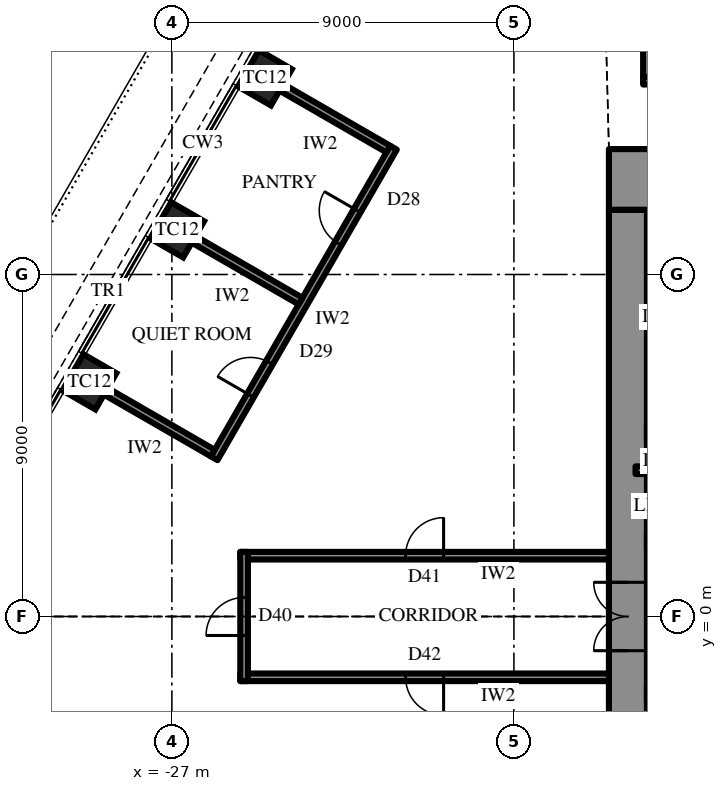
"""IFC4 building model, lengths in metres.
Left out: names, types, materials, properties, quantities, classifications, styles, units other than length and angle.
Written with IfcOpenShell. Run it as: python <this file> out.ifc"""

import sys

from ifc_helpers import new_model, si_unit, direction, frame, frame_2d, origin, origin_2d, place, context, subcontext, project, spatial, rectangle, extrude, element, fill, save


model = new_model("IFC4")
c1 = context("Model", 3, precision=1e-05, world=origin(), true_north=direction((0.0, 1.0)))
c2 = subcontext(c1, "Body", "Model", "MODEL_VIEW")
j1 = project(units=[si_unit("LENGTHUNIT", "METRE"), si_unit("PLANEANGLEUNIT", "RADIAN")], contexts=[c1])
p1 = place(None, origin())
s1 = spatial("IfcSite", under=j1, at=p1, CompositionType="ELEMENT")
p2 = place(p1, origin())
s2 = spatial("IfcBuilding", under=s1, at=p2, CompositionType="ELEMENT")
p3 = place(p2, frame((0.0, 0.0, 286.9)))
s3 = spatial("IfcBuildingStorey", under=s2, at=p3, CompositionType="ELEMENT", Elevation=286.9)
for number, where, z_axis, x_axis in (
    (1, (-24.552, 14.175, 0.0), (0.0, 0.0, 1.0), (-0.5, -0.866, 0.0)),
    (2, (-26.861, 10.175, 0.0), (0.0, 0.0, 1.0), (-0.5, -0.866, 0.0)),
    (3, (-29.171, 6.175, 0.0), (0.0, 0.0, 1.0), (-0.5, -0.866, 0.0)),
):
    element("IfcColumn", number, at=place(p3, frame(where, z_axis=z_axis, x_axis=x_axis)), inside=s3, PredefinedType="COLUMN", context=c2, shape_type="SweptSolid", body=[
        extrude(rectangle(XDim=1.1, YDim=1.0, at=origin_2d()), origin(), (0.0, 0.0, 1.0), 4.2),
    ])
p4 = place(p3, frame((-15.5, 11.5, 0.0), z_axis=(0.0, 0.0, 1.0), x_axis=(1.0, 0.0, 0.0)))
e4 = element("IfcWall", 4, at=p4, inside=s3, PredefinedType="SHEAR", context=c2, shape_type="SweptSolid", body=[
    extrude(rectangle(XDim=31.0, YDim=1.6, at=frame_2d((15.5, 0.0))), origin(), (0.0, 0.0, 1.0), 4.2),
])
p5 = place(p4, frame((16.35, 0.0, 0.0)))
e5 = element("IfcOpeningElement", 5, at=p5, cuts=e4, PredefinedType="OPENING", context=c2, shape_type="SweptSolid", body=[
    extrude(rectangle(XDim=0.9, YDim=2.2, at=frame_2d((0.45, 1.1))), frame((0.0, 0.81, 0.0), z_axis=(0.0, -1.0, 0.0), x_axis=(1.0, 0.0, 0.0)), (0.0, 0.0, 1.0), 1.62),
])
p6 = place(p4, frame((19.35, 0.0, 0.0)))
e6 = element("IfcOpeningElement", 6, at=p6, cuts=e4, PredefinedType="OPENING", context=c2, shape_type="SweptSolid", body=[
    extrude(rectangle(XDim=0.9, YDim=2.2, at=frame_2d((0.45, 1.1))), frame((0.0, 0.81, 0.0), z_axis=(0.0, -1.0, 0.0), x_axis=(1.0, 0.0, 0.0)), (0.0, 0.0, 1.0), 1.62),
])
p7 = place(p4, frame((22.4, 0.0, 0.0)))
e7 = element("IfcOpeningElement", 7, at=p7, cuts=e4, PredefinedType="OPENING", context=c2, shape_type="SweptSolid", body=[
    extrude(rectangle(XDim=1.0, YDim=2.2, at=frame_2d((0.5, 1.1))), frame((0.0, 0.81, 0.0), z_axis=(0.0, -1.0, 0.0), x_axis=(1.0, 0.0, 0.0)), (0.0, 0.0, 1.0), 1.62),
])
p8 = place(p4, frame((1.65, 0.0, 0.0)))
e8 = element("IfcOpeningElement", 8, at=p8, cuts=e4, PredefinedType="OPENING", context=c2, shape_type="SweptSolid", body=[
    extrude(rectangle(XDim=0.9, YDim=2.2, at=frame_2d((0.45, 1.1))), frame((0.0, 0.81, 0.0), z_axis=(0.0, -1.0, 0.0), x_axis=(1.0, 0.0, 0.0)), (0.0, 0.0, 1.0), 1.62),
])
p9 = place(p4, frame((4.65, 0.0, 0.0)))
e9 = element("IfcOpeningElement", 9, at=p9, cuts=e4, PredefinedType="OPENING", context=c2, shape_type="SweptSolid", body=[
    extrude(rectangle(XDim=0.9, YDim=2.2, at=frame_2d((0.45, 1.1))), frame((0.0, 0.81, 0.0), z_axis=(0.0, -1.0, 0.0), x_axis=(1.0, 0.0, 0.0)), (0.0, 0.0, 1.0), 1.62),
])
p10 = place(p4, frame((25.45, 0.0, 0.0)))
e10 = element("IfcOpeningElement", 10, at=p10, cuts=e4, PredefinedType="OPENING", context=c2, shape_type="SweptSolid", body=[
    extrude(rectangle(XDim=0.9, YDim=2.2, at=frame_2d((0.45, 1.1))), frame((0.0, 0.81, 0.0), z_axis=(0.0, -1.0, 0.0), x_axis=(1.0, 0.0, 0.0)), (0.0, 0.0, 1.0), 1.62),
])
p11 = place(p4, frame((28.45, 0.0, 0.0)))
e11 = element("IfcOpeningElement", 11, at=p11, cuts=e4, PredefinedType="OPENING", context=c2, shape_type="SweptSolid", body=[
    extrude(rectangle(XDim=0.9, YDim=2.2, at=frame_2d((0.45, 1.1))), frame((0.0, 0.81, 0.0), z_axis=(0.0, -1.0, 0.0), x_axis=(1.0, 0.0, 0.0)), (0.0, 0.0, 1.0), 1.62),
])
p12 = place(p3, frame((-15.0, 10.7, 0.0), z_axis=(0.0, 0.0, 1.0), x_axis=(0.0, -1.0, 0.0)))
e12 = element("IfcWall", 12, at=p12, inside=s3, PredefinedType="SHEAR", context=c2, shape_type="SweptSolid", body=[
    extrude(rectangle(XDim=21.4, YDim=1.0, at=frame_2d((10.7, 0.0))), origin(), (0.0, 0.0, 1.0), 4.2),
])
p13 = place(p12, frame((9.8, 0.0, 0.0)))
e13 = element("IfcOpeningElement", 13, at=p13, cuts=e12, PredefinedType="OPENING", context=c2, shape_type="SweptSolid", body=[
    extrude(rectangle(XDim=1.8, YDim=2.4, at=frame_2d((0.9, 1.2))), frame((0.0, 0.51, 0.0), z_axis=(0.0, -1.0, 0.0), x_axis=(1.0, 0.0, 0.0)), (0.0, 0.0, 1.0), 1.02),
])
p14 = place(p3, frame((-12.3, -2.0, 0.0), z_axis=(0.0, 0.0, 1.0), x_axis=(-1.0, 0.0, 0.0)))
e14 = element("IfcWall", 14, at=p14, inside=s3, PredefinedType="SHEAR", context=c2, shape_type="SweptSolid", body=[
    extrude(rectangle(XDim=2.2, YDim=0.5, at=frame_2d((1.1, 0.0))), origin(), (0.0, 0.0, 1.0), 4.2),
])
p15 = place(p14, frame((0.8, 0.0, 0.0)))
e15 = element("IfcOpeningElement", 15, at=p15, cuts=e14, PredefinedType="OPENING", context=c2, shape_type="SweptSolid", body=[
    extrude(rectangle(XDim=0.9, YDim=2.2, at=frame_2d((0.45, 1.1))), frame((0.0, 0.26, 0.0), z_axis=(0.0, -1.0, 0.0), x_axis=(1.0, 0.0, 0.0)), (0.0, 0.0, 1.0), 0.52),
])
p16 = place(p3, frame((-14.8, 3.85, 0.0), z_axis=(0.0, 0.0, 1.0), x_axis=(1.0, 0.0, 0.0)))
e16 = element("IfcWall", 16, at=p16, inside=s3, PredefinedType="PARTITIONING", context=c2, shape_type="SweptSolid", body=[
    extrude(rectangle(XDim=2.5, YDim=0.2, at=frame_2d((1.25, 0.0))), origin(), (0.0, 0.0, 1.0), 4.0),
])
p17 = place(p3, frame((-14.6, 14.1, 0.0), z_axis=(0.0, 0.0, 1.0), x_axis=(1.0, 0.0, 0.0)))
e17 = element("IfcWall", 17, at=p17, inside=s3, PredefinedType="PARTITIONING", context=c2, shape_type="SweptSolid", body=[
    extrude(rectangle(XDim=29.2, YDim=0.2, at=frame_2d((14.6, 0.0))), origin(), (0.0, 0.0, 1.0), 4.0),
])
p18 = place(p3, frame((-14.5, 14.2, 0.0), z_axis=(0.0, 0.0, 1.0), x_axis=(0.0, 1.0, 0.0)))
e18 = element("IfcWall", 18, at=p18, inside=s3, PredefinedType="PARTITIONING", context=c2, shape_type="SweptSolid", body=[
    extrude(rectangle(XDim=3.8, YDim=0.2, at=frame_2d((1.9, 0.0))), origin(), (0.0, 0.0, 1.0), 4.0),
])
p19 = place(p3, frame((-21.168, 12.337, 0.0), z_axis=(0.0, 0.0, 1.0), x_axis=(-0.499989672313, -0.866031366395, 0.0)))
e19 = element("IfcWall", 19, at=p19, inside=s3, PredefinedType="PARTITIONING", context=c2, shape_type="SweptSolid", body=[
    extrude(rectangle(XDim=9.438, YDim=0.2, at=frame_2d((4.719, 0.0))), origin(), (0.0, 0.0, 1.0), 4.0),
])
p20 = place(p19, frame((1.909, 0.0, 0.0)))
e20 = element("IfcOpeningElement", 20, at=p20, cuts=e19, PredefinedType="OPENING", context=c2, shape_type="SweptSolid", body=[
    extrude(rectangle(XDim=1.0, YDim=2.2, at=frame_2d((0.5, 1.1))), frame((0.0, 0.11, 0.0), z_axis=(0.0, -1.0, 0.0), x_axis=(1.0, 0.0, 0.0)), (0.0, 0.0, 1.0), 0.22),
])
p21 = place(p19, frame((6.528, 0.0, 0.0)))
e21 = element("IfcOpeningElement", 21, at=p21, cuts=e19, PredefinedType="OPENING", context=c2, shape_type="SweptSolid", body=[
    extrude(rectangle(XDim=1.0, YDim=2.2, at=frame_2d((0.5, 1.1))), frame((0.0, 0.11, 0.0), z_axis=(0.0, -1.0, 0.0), x_axis=(1.0, 0.0, 0.0)), (0.0, 0.0, 1.0), 0.22),
])
for number, where, z_axis, x_axis in (
    (22, (-21.304, 12.3, 0.0), (0.0, 0.0, 1.0), (-0.866, 0.5, 0.0)),
    (23, (-23.614, 8.3, 0.0), (0.0, 0.0, 1.0), (-0.866, 0.5, 0.0)),
    (24, (-25.923, 4.3, 0.0), (0.0, 0.0, 1.0), (-0.866, 0.5, 0.0)),
):
    element("IfcWall", number, at=place(p3, frame(where, z_axis=z_axis, x_axis=x_axis)), inside=s3, PredefinedType="PARTITIONING", context=c2, shape_type="SweptSolid", body=[
        extrude(rectangle(XDim=3.25, YDim=0.2, at=frame_2d((1.625, 0.0))), origin(), (0.0, 0.0, 1.0), 3.082),
    ])
p22 = place(p3, frame((-15.5, 1.6, 0.0), z_axis=(0.0, 0.0, 1.0), x_axis=(-1.0, 0.0, 0.0)))
e25 = element("IfcWall", 25, at=p22, inside=s3, PredefinedType="PARTITIONING", context=c2, shape_type="SweptSolid", body=[
    extrude(rectangle(XDim=9.7, YDim=0.2, at=frame_2d((4.85, 0.0))), origin(), (0.0, 0.0, 1.0), 4.0),
])
p23 = place(p22, frame((4.35, 0.0, 0.0)))
e26 = element("IfcOpeningElement", 26, at=p23, cuts=e25, PredefinedType="OPENING", context=c2, shape_type="SweptSolid", body=[
    extrude(rectangle(XDim=1.0, YDim=2.2, at=frame_2d((0.5, 1.1))), frame((0.0, 0.11, 0.0), z_axis=(0.0, -1.0, 0.0), x_axis=(1.0, 0.0, 0.0)), (0.0, 0.0, 1.0), 0.22),
])
p24 = place(p3, frame((-15.5, -1.6, 0.0), z_axis=(0.0, 0.0, 1.0), x_axis=(-1.0, 0.0, 0.0)))
e27 = element("IfcWall", 27, at=p24, inside=s3, PredefinedType="PARTITIONING", context=c2, shape_type="SweptSolid", body=[
    extrude(rectangle(XDim=9.7, YDim=0.2, at=frame_2d((4.85, 0.0))), origin(), (0.0, 0.0, 1.0), 4.0),
])
p25 = place(p24, frame((4.35, 0.0, 0.0)))
e28 = element("IfcOpeningElement", 28, at=p25, cuts=e27, PredefinedType="OPENING", context=c2, shape_type="SweptSolid", body=[
    extrude(rectangle(XDim=1.0, YDim=2.2, at=frame_2d((0.5, 1.1))), frame((0.0, 0.11, 0.0), z_axis=(0.0, -1.0, 0.0), x_axis=(1.0, 0.0, 0.0)), (0.0, 0.0, 1.0), 0.22),
])
p26 = place(p3, frame((-25.1, -1.7, 0.0), z_axis=(0.0, 0.0, 1.0), x_axis=(0.0, 1.0, 0.0)))
e29 = element("IfcWall", 29, at=p26, inside=s3, PredefinedType="PARTITIONING", context=c2, shape_type="SweptSolid", body=[
    extrude(rectangle(XDim=3.4, YDim=0.2, at=frame_2d((1.7, 0.0))), origin(), (0.0, 0.0, 1.0), 4.0),
])
p27 = place(p26, frame((1.2, 0.0, 0.0)))
e30 = element("IfcOpeningElement", 30, at=p27, cuts=e29, PredefinedType="OPENING", context=c2, shape_type="SweptSolid", body=[
    extrude(rectangle(XDim=1.0, YDim=2.2, at=frame_2d((0.5, 1.1))), frame((0.0, 0.11, 0.0), z_axis=(0.0, -1.0, 0.0), x_axis=(1.0, 0.0, 0.0)), (0.0, 0.0, 1.0), 0.22),
])
p28 = place(p13, frame((1.8, 0.0, 0.0), z_axis=(0.0, 0.0, 1.0), x_axis=(-1.0, 0.0, 0.0)))
e31 = element("IfcDoor", 31, at=p28, inside=s3, OperationType="DOUBLE_DOOR_SINGLE_SWING", PredefinedType="DOOR", context=c2, shape_type="SweptSolid", body=[
    extrude(rectangle(XDim=1.8, YDim=2.4, at=frame_2d((0.9, 1.2))), frame((0.0, 0.025, 0.0), z_axis=(0.0, -1.0, 0.0), x_axis=(1.0, 0.0, 0.0)), (0.0, 0.0, 1.0), 0.05),
])
fill(e13, e31)
p29 = place(p20, frame((1.0, 0.0, 0.0), z_axis=(0.0, 0.0, 1.0), x_axis=(-1.0, 0.0, 0.0)))
e32 = element("IfcDoor", 32, at=p29, inside=s3, OperationType="SINGLE_SWING_LEFT", PredefinedType="DOOR", context=c2, shape_type="SweptSolid", body=[
    extrude(rectangle(XDim=1.0, YDim=2.2, at=frame_2d((0.5, 1.1))), frame((0.0, 0.025, 0.0), z_axis=(0.0, -1.0, 0.0), x_axis=(1.0, 0.0, 0.0)), (0.0, 0.0, 1.0), 0.05),
])
fill(e20, e32)
p30 = place(p21, frame((1.0, 0.0, 0.0), z_axis=(0.0, 0.0, 1.0), x_axis=(-1.0, 0.0, 0.0)))
e33 = element("IfcDoor", 33, at=p30, inside=s3, OperationType="SINGLE_SWING_RIGHT", PredefinedType="DOOR", context=c2, shape_type="SweptSolid", body=[
    extrude(rectangle(XDim=1.0, YDim=2.2, at=frame_2d((0.5, 1.1))), frame((0.0, 0.025, 0.0), z_axis=(0.0, -1.0, 0.0), x_axis=(1.0, 0.0, 0.0)), (0.0, 0.0, 1.0), 0.05),
])
fill(e21, e33)
p31 = place(p23, frame((1.0, 0.0, 0.0), z_axis=(0.0, 0.0, 1.0), x_axis=(-1.0, 0.0, 0.0)))
e34 = element("IfcDoor", 34, at=p31, inside=s3, OperationType="SINGLE_SWING_LEFT", PredefinedType="DOOR", context=c2, shape_type="SweptSolid", body=[
    extrude(rectangle(XDim=1.0, YDim=2.2, at=frame_2d((0.5, 1.1))), frame((0.0, 0.025, 0.0), z_axis=(0.0, -1.0, 0.0), x_axis=(1.0, 0.0, 0.0)), (0.0, 0.0, 1.0), 0.05),
])
fill(e26, e34)
p32 = place(p25, origin())
e35 = element("IfcDoor", 35, at=p32, inside=s3, OperationType="SINGLE_SWING_RIGHT", PredefinedType="DOOR", context=c2, shape_type="SweptSolid", body=[
    extrude(rectangle(XDim=1.0, YDim=2.2, at=frame_2d((0.5, 1.1))), frame((0.0, 0.025, 0.0), z_axis=(0.0, -1.0, 0.0), x_axis=(1.0, 0.0, 0.0)), (0.0, 0.0, 1.0), 0.05),
])
fill(e28, e35)
p33 = place(p27, origin())
e36 = element("IfcDoor", 36, at=p33, inside=s3, OperationType="SINGLE_SWING_RIGHT", PredefinedType="DOOR", context=c2, shape_type="SweptSolid", body=[
    extrude(rectangle(XDim=1.0, YDim=2.2, at=frame_2d((0.5, 1.1))), frame((0.0, 0.025, 0.0), z_axis=(0.0, -1.0, 0.0), x_axis=(1.0, 0.0, 0.0)), (0.0, 0.0, 1.0), 0.05),
])
fill(e30, e36)
save(model, sys.argv[1])
